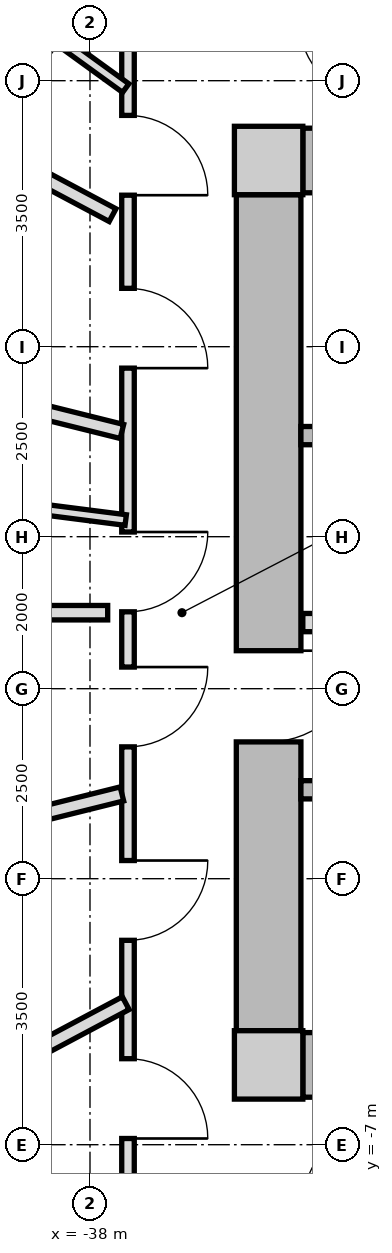
"""IFC4 building model, lengths in metres.
Left out: names, types, materials, properties, quantities, classifications, styles, units other than length and angle.
Written with IfcOpenShell. Run it as: python <this file> out.ifc"""

import sys

from ifc_helpers import new_model, si_unit, direction, frame, frame_2d, origin, origin_2d, place, context, subcontext, project, spatial, rectangle, extrude, source, transform, mapped, element, fill, save


model = new_model("IFC4")
c1 = context("Model", 3, precision=1e-05, world=origin(), true_north=direction((0.0, 1.0)))
c2 = subcontext(c1, "Body", "Model", "MODEL_VIEW")
j1 = project(units=[si_unit("LENGTHUNIT", "METRE"), si_unit("PLANEANGLEUNIT", "RADIAN")], contexts=[c1])
p1 = place(None, origin())
s1 = spatial("IfcSite", under=j1, at=p1, CompositionType="ELEMENT")
p2 = place(p1, origin())
s2 = spatial("IfcBuilding", under=s1, at=p2, CompositionType="ELEMENT")
p3 = place(p2, frame((0.0, 0.0, 42.95)))
s3 = spatial("IfcBuildingStorey", under=s2, at=p3, CompositionType="ELEMENT", Elevation=42.95)
m1 = source(origin(), c2, "Body", "SweptSolid", [
    extrude(rectangle(XDim=0.9, YDim=0.9, at=origin_2d()), origin(), (0.0, 0.0, 1.0), 3.05),
])
for number, where, z_axis, x_axis in (
    (1, (-35.65, -5.95, 0.0), (0.0, 0.0, 1.0), (1.0, 0.0, 0.0)),
    (2, (-35.65, 5.95, 0.0), (0.0, 0.0, 1.0), (1.0, 0.0, 0.0)),
):
    element("IfcColumn", number, at=place(p3, frame(where, z_axis=z_axis, x_axis=x_axis)), inside=s3, PredefinedType="COLUMN", context=c2, shape_type="MappedRepresentation", body=[
        mapped(m1, transform((0.0, 0.0, 0.0), x_axis=(1.0, 0.0, 0.0), y_axis=(0.0, 1.0, 0.0), z_axis=(0.0, 0.0, 1.0), scale=1.0)),
    ])
m2 = source(origin(), c2, "Body", "SweptSolid", [
    extrude(rectangle(XDim=14.4, YDim=0.85, at=frame_2d((7.2, 0.0))), origin(), (0.0, 0.0, 1.0), 2.79),
])
for number, where, z_axis, x_axis in (
    (3, (-35.2, 5.95, 0.0), (0.0, 0.0, 1.0), (1.0, 0.0, 0.0)),
    (4, (-20.8, -5.95, 0.0), (0.0, 0.0, 1.0), (-1.0, 0.0, 0.0)),
):
    element("IfcWall", number, at=place(p3, frame(where, z_axis=z_axis, x_axis=x_axis)), inside=s3, PredefinedType="SHEAR", context=c2, shape_type="MappedRepresentation", body=[
        mapped(m2, transform((0.0, 0.0, 0.0), x_axis=(1.0, 0.0, 0.0), y_axis=(0.0, 1.0, 0.0), z_axis=(0.0, 0.0, 1.0), scale=1.0)),
    ])
m3 = source(origin(), c2, "Body", "SweptSolid", [
    extrude(rectangle(XDim=11.0, YDim=0.85, at=frame_2d((5.5, 0.0))), origin(), (0.0, 0.0, 1.0), 2.79),
])
p4 = place(p3, frame((-35.65, -5.5, 0.0), z_axis=(0.0, 0.0, 1.0), x_axis=(0.0, 1.0, 0.0)))
e5 = element("IfcWall", 5, at=p4, inside=s3, PredefinedType="SHEAR", context=c2, shape_type="MappedRepresentation", body=[
    mapped(m3, transform((0.0, 0.0, 0.0), x_axis=(1.0, 0.0, 0.0), y_axis=(0.0, 1.0, 0.0), z_axis=(0.0, 0.0, 1.0), scale=1.0)),
])
p5 = place(p4, frame((3.8, 0.0, 0.0)))
e6 = element("IfcOpeningElement", 6, at=p5, cuts=e5, PredefinedType="OPENING", context=c2, shape_type="SweptSolid", body=[
    extrude(rectangle(XDim=1.2, YDim=2.15, at=frame_2d((0.6, 1.075))), frame((0.0, 0.435, 0.0), z_axis=(0.0, -1.0, 0.0), x_axis=(1.0, 0.0, 0.0)), (0.0, 0.0, 1.0), 0.87),
])
m4 = source(origin(), c2, "Body", "SweptSolid", [
    extrude(rectangle(XDim=7.765, YDim=0.24, at=frame_2d((3.883, 0.0))), origin(), (0.0, 0.0, 1.0), 2.79),
])
p6 = place(p3, frame((-35.225, 2.33, 0.0), z_axis=(0.0, 0.0, 1.0), x_axis=(1.0, 0.0, 0.0)))
e7 = element("IfcWall", 7, at=p6, inside=s3, PredefinedType="PARTITIONING", context=c2, shape_type="MappedRepresentation", body=[
    mapped(m4, transform((0.0, 0.0, 0.0), x_axis=(1.0, 0.0, 0.0), y_axis=(0.0, 1.0, 0.0), z_axis=(0.0, 0.0, 1.0), scale=1.0)),
])
p7 = place(p3, frame((-35.225, -2.33, 0.0), z_axis=(0.0, 0.0, 1.0), x_axis=(1.0, 0.0, 0.0)))
e8 = element("IfcWall", 8, at=p7, inside=s3, PredefinedType="PARTITIONING", context=c2, shape_type="MappedRepresentation", body=[
    mapped(m4, transform((0.0, 0.0, 0.0), x_axis=(1.0, 0.0, 0.0), y_axis=(0.0, 1.0, 0.0), z_axis=(0.0, 0.0, 1.0), scale=1.0)),
])
p8 = place(p7, frame((0.885, 0.0, 0.0)))
e9 = element("IfcOpeningElement", 9, at=p8, cuts=e8, PredefinedType="OPENING", context=c2, shape_type="SweptSolid", body=[
    extrude(rectangle(XDim=1.1, YDim=2.15, at=frame_2d((0.55, 1.075))), frame((0.0, 0.13, 0.0), z_axis=(0.0, -1.0, 0.0), x_axis=(1.0, 0.0, 0.0)), (0.0, 0.0, 1.0), 0.26),
])
m5 = source(origin(), c2, "Body", "SweptSolid", [
    extrude(rectangle(XDim=7.62, YDim=0.24, at=frame_2d((3.81, 0.0))), origin(), (0.0, 0.0, 1.0), 2.775),
])
p9 = place(p3, frame((-35.2, -0.13, 0.0), z_axis=(0.0, 0.0, 1.0), x_axis=(1.0, 0.0, 0.0)))
e10 = element("IfcWall", 10, at=p9, inside=s3, PredefinedType="PARTITIONING", context=c2, shape_type="MappedRepresentation", body=[
    mapped(m5, transform((0.0, 0.0, 0.0), x_axis=(1.0, 0.0, 0.0), y_axis=(0.0, 1.0, 0.0), z_axis=(0.0, 0.0, 1.0), scale=1.0)),
])
p10 = place(p9, frame((6.22, 0.0, 0.0)))
e11 = element("IfcOpeningElement", 11, at=p10, cuts=e10, PredefinedType="OPENING", context=c2, shape_type="SweptSolid", body=[
    extrude(rectangle(XDim=1.0, YDim=2.1, at=frame_2d((0.5, 1.05))), frame((0.0, 0.13, 0.0), z_axis=(0.0, -1.0, 0.0), x_axis=(1.0, 0.0, 0.0)), (0.0, 0.0, 1.0), 0.26),
])
p11 = place(p9, frame((0.85, 0.0, 0.0)))
e12 = element("IfcOpeningElement", 12, at=p11, cuts=e10, PredefinedType="OPENING", context=c2, shape_type="SweptSolid", body=[
    extrude(rectangle(XDim=1.1, YDim=2.2, at=frame_2d((0.55, 1.1))), frame((0.0, 0.13, 0.0), z_axis=(0.0, -1.0, 0.0), x_axis=(1.0, 0.0, 0.0)), (0.0, 0.0, 1.0), 0.26),
])
p12 = place(p9, frame((3.85, 0.0, 0.0)))
e13 = element("IfcOpeningElement", 13, at=p12, cuts=e10, PredefinedType="OPENING", context=c2, shape_type="SweptSolid", body=[
    extrude(rectangle(XDim=1.1, YDim=2.2, at=frame_2d((0.55, 1.1))), frame((0.0, 0.13, 0.0), z_axis=(0.0, -1.0, 0.0), x_axis=(1.0, 0.0, 0.0)), (0.0, 0.0, 1.0), 0.26),
])
m6 = source(origin(), c2, "Body", "SweptSolid", [
    extrude(rectangle(XDim=15.6, YDim=0.165, at=frame_2d((7.8, 0.0))), origin(), (0.0, 0.0, 1.0), 2.775),
])
p13 = place(p3, frame((-37.5, -7.8, 0.0), z_axis=(0.0, 0.0, 1.0), x_axis=(0.0, 1.0, 0.0)))
e14 = element("IfcWall", 14, at=p13, inside=s3, PredefinedType="PARTITIONING", context=c2, shape_type="MappedRepresentation", body=[
    mapped(m6, transform((0.0, 0.0, 0.0), x_axis=(1.0, 0.0, 0.0), y_axis=(0.0, 1.0, 0.0), z_axis=(0.0, 0.0, 1.0), scale=1.0)),
])
p14 = place(p13, frame((13.293, 0.0, 0.0)))
e15 = element("IfcOpeningElement", 15, at=p14, cuts=e14, PredefinedType="OPENING", context=c2, shape_type="SweptSolid", body=[
    extrude(rectangle(XDim=1.05, YDim=2.15, at=frame_2d((0.525, 1.075))), frame((0.0, 0.093, 0.0), z_axis=(0.0, -1.0, 0.0), x_axis=(1.0, 0.0, 0.0)), (0.0, 0.0, 1.0), 0.185),
])
p15 = place(p13, frame((11.018, 0.0, 0.0)))
e16 = element("IfcOpeningElement", 16, at=p15, cuts=e14, PredefinedType="OPENING", context=c2, shape_type="SweptSolid", body=[
    extrude(rectangle(XDim=1.05, YDim=2.15, at=frame_2d((0.525, 1.075))), frame((0.0, 0.093, 0.0), z_axis=(0.0, -1.0, 0.0), x_axis=(1.0, 0.0, 0.0)), (0.0, 0.0, 1.0), 0.185),
])
p16 = place(p13, frame((7.812, 0.0, 0.0)))
e17 = element("IfcOpeningElement", 17, at=p16, cuts=e14, PredefinedType="OPENING", context=c2, shape_type="SweptSolid", body=[
    extrude(rectangle(XDim=1.05, YDim=2.15, at=frame_2d((0.525, 1.075))), frame((0.0, 0.093, 0.0), z_axis=(0.0, -1.0, 0.0), x_axis=(1.0, 0.0, 0.0)), (0.0, 0.0, 1.0), 0.185),
])
p17 = place(p13, frame((6.035, 0.0, 0.0)))
e18 = element("IfcOpeningElement", 18, at=p17, cuts=e14, PredefinedType="OPENING", context=c2, shape_type="SweptSolid", body=[
    extrude(rectangle(XDim=1.05, YDim=2.15, at=frame_2d((0.525, 1.075))), frame((0.0, 0.093, 0.0), z_axis=(0.0, -1.0, 0.0), x_axis=(1.0, 0.0, 0.0)), (0.0, 0.0, 1.0), 0.185),
])
p18 = place(p13, frame((3.489, 0.0, 0.0)))
e19 = element("IfcOpeningElement", 19, at=p18, cuts=e14, PredefinedType="OPENING", context=c2, shape_type="SweptSolid", body=[
    extrude(rectangle(XDim=1.05, YDim=2.15, at=frame_2d((0.525, 1.075))), frame((0.0, 0.093, 0.0), z_axis=(0.0, -1.0, 0.0), x_axis=(1.0, 0.0, 0.0)), (0.0, 0.0, 1.0), 0.185),
])
p19 = place(p13, frame((0.882, 0.0, 0.0)))
e20 = element("IfcOpeningElement", 20, at=p19, cuts=e14, PredefinedType="OPENING", context=c2, shape_type="SweptSolid", body=[
    extrude(rectangle(XDim=1.05, YDim=2.15, at=frame_2d((0.525, 1.075))), frame((0.0, 0.093, 0.0), z_axis=(0.0, -1.0, 0.0), x_axis=(1.0, 0.0, 0.0)), (0.0, 0.0, 1.0), 0.185),
])
m7 = source(origin(), c2, "Body", "SweptSolid", [
    extrude(rectangle(XDim=9.737, YDim=0.19, at=frame_2d((4.869, 0.0))), origin(), (0.0, 0.0, 1.0), 2.225),
])
p20 = place(p3, frame((-37.58, 2.385, 0.0), z_axis=(0.0, 0.0, 1.0), x_axis=(-0.970392716238, 0.241532557375, 0.0)))
e21 = element("IfcWall", 21, at=p20, inside=s3, PredefinedType="PARTITIONING", context=c2, shape_type="MappedRepresentation", body=[
    mapped(m7, transform((0.0, 0.0, 0.0), x_axis=(1.0, 0.0, 0.0), y_axis=(0.0, 1.0, 0.0), z_axis=(0.0, 0.0, 1.0), scale=1.0)),
])
m8 = source(origin(), c2, "Body", "SweptSolid", [
    extrude(rectangle(XDim=7.677, YDim=0.19, at=frame_2d((3.838, 0.0))), origin(), (0.0, 0.0, 1.0), 2.775),
])
p21 = place(p3, frame((-37.703, 5.231, 0.0), z_axis=(0.0, 0.0, 1.0), x_axis=(-0.882725057546, 0.469889851753, 0.0)))
e22 = element("IfcWall", 22, at=p21, inside=s3, PredefinedType="PARTITIONING", context=c2, shape_type="MappedRepresentation", body=[
    mapped(m8, transform((0.0, 0.0, 0.0), x_axis=(1.0, 0.0, 0.0), y_axis=(0.0, 1.0, 0.0), z_axis=(0.0, 0.0, 1.0), scale=1.0)),
])
m9 = source(origin(), c2, "Body", "SweptSolid", [
    extrude(rectangle(XDim=3.051, YDim=0.14, at=frame_2d((1.525, 0.0))), origin(), (0.0, 0.0, 1.0), 2.775),
])
p22 = place(p3, frame((-37.53, 6.903, 0.0), z_axis=(0.0, 0.0, 1.0), x_axis=(-0.809849031404, 0.586638343729, 0.0)))
e23 = element("IfcWall", 23, at=p22, inside=s3, PredefinedType="PARTITIONING", context=c2, shape_type="MappedRepresentation", body=[
    mapped(m9, transform((0.0, 0.0, 0.0), x_axis=(1.0, 0.0, 0.0), y_axis=(0.0, 1.0, 0.0), z_axis=(0.0, 0.0, 1.0), scale=1.0)),
])
p23 = place(p22, frame((1.065, 0.0, 0.0)))
e24 = element("IfcOpeningElement", 24, at=p23, cuts=e23, PredefinedType="OPENING", context=c2, shape_type="SweptSolid", body=[
    extrude(rectangle(XDim=0.92, YDim=2.1, at=frame_2d((0.46, 1.05))), frame((0.0, 0.08, 0.0), z_axis=(0.0, -1.0, 0.0), x_axis=(1.0, 0.0, 0.0)), (0.0, 0.0, 1.0), 0.16),
])
p24 = place(p3, frame((-37.58, -2.385, 0.0), z_axis=(0.0, 0.0, 1.0), x_axis=(-0.970392716238, -0.241532557375, 0.0)))
e25 = element("IfcWall", 25, at=p24, inside=s3, PredefinedType="PARTITIONING", context=c2, shape_type="MappedRepresentation", body=[
    mapped(m7, transform((0.0, 0.0, 0.0), x_axis=(1.0, 0.0, 0.0), y_axis=(0.0, 1.0, 0.0), z_axis=(0.0, 0.0, 1.0), scale=1.0)),
])
m10 = source(origin(), c2, "Body", "SweptSolid", [
    extrude(rectangle(XDim=9.261, YDim=0.19, at=frame_2d((4.631, 0.0))), origin(), (0.0, 0.0, 1.0), 2.775),
])
p25 = place(p3, frame((-37.767, 0.0, 0.0), z_axis=(0.0, 0.0, 1.0), x_axis=(-1.0, 0.0, 0.0)))
e26 = element("IfcWall", 26, at=p25, inside=s3, PredefinedType="PARTITIONING", context=c2, shape_type="MappedRepresentation", body=[
    mapped(m10, transform((0.0, 0.0, 0.0), x_axis=(1.0, 0.0, 0.0), y_axis=(0.0, 1.0, 0.0), z_axis=(0.0, 0.0, 1.0), scale=1.0)),
])
m11 = source(origin(), c2, "Body", "SweptSolid", [
    extrude(rectangle(XDim=4.21, YDim=0.14, at=frame_2d((2.105, 0.0))), origin(), (0.0, 0.0, 1.0), 2.775),
])
p26 = place(p3, frame((-37.53, 1.219, 0.0), z_axis=(0.0, 0.0, 1.0), x_axis=(-0.991917821325, 0.126881975625, 0.0)))
e27 = element("IfcWall", 27, at=p26, inside=s3, PredefinedType="PARTITIONING", context=c2, shape_type="MappedRepresentation", body=[
    mapped(m11, transform((0.0, 0.0, 0.0), x_axis=(1.0, 0.0, 0.0), y_axis=(0.0, 1.0, 0.0), z_axis=(0.0, 0.0, 1.0), scale=1.0)),
])
p27 = place(p26, frame((1.645, 0.0, 0.0)))
e28 = element("IfcOpeningElement", 28, at=p27, cuts=e27, PredefinedType="OPENING", context=c2, shape_type="SweptSolid", body=[
    extrude(rectangle(XDim=0.92, YDim=2.1, at=frame_2d((0.46, 1.05))), frame((0.0, 0.08, 0.0), z_axis=(0.0, -1.0, 0.0), x_axis=(1.0, 0.0, 0.0)), (0.0, 0.0, 1.0), 0.16),
])
m12 = source(origin(), c2, "Body", "SweptSolid", [
    extrude(rectangle(XDim=7.873, YDim=0.19, at=frame_2d((3.937, 0.0))), origin(), (0.0, 0.0, 1.0), 2.775),
])
p28 = place(p3, frame((-37.53, -5.138, 0.0), z_axis=(0.0, 0.0, 1.0), x_axis=(-0.882666052726, -0.470000680175, 0.0)))
e29 = element("IfcWall", 29, at=p28, inside=s3, PredefinedType="PARTITIONING", context=c2, shape_type="MappedRepresentation", body=[
    mapped(m12, transform((0.0, 0.0, 0.0), x_axis=(1.0, 0.0, 0.0), y_axis=(0.0, 1.0, 0.0), z_axis=(0.0, 0.0, 1.0), scale=1.0)),
])
m13 = source(origin(), c2, "Body", "SweptSolid", [
    extrude(rectangle(XDim=1.2, YDim=2.15, at=frame_2d((0.6, 1.075))), frame((0.0, 0.025, 0.0), z_axis=(0.0, -1.0, 0.0), x_axis=(1.0, 0.0, 0.0)), (0.0, 0.0, 1.0), 0.05),
])
p29 = place(p5, frame((1.2, 0.0, 0.0), z_axis=(0.0, 0.0, 1.0), x_axis=(-1.0, 0.0, 0.0)))
e30 = element("IfcDoor", 30, at=p29, inside=s3, OperationType="SINGLE_SWING_LEFT", PredefinedType="DOOR", context=c2, shape_type="MappedRepresentation", body=[
    mapped(m13, transform((0.0, 0.0, 0.0), x_axis=(1.0, 0.0, 0.0), y_axis=(0.0, 1.0, 0.0), z_axis=(0.0, 0.0, 1.0), scale=1.0)),
])
fill(e6, e30)
m14 = source(origin(), c2, "Body", "SweptSolid", [
    extrude(rectangle(XDim=1.05, YDim=2.15, at=frame_2d((0.525, 1.075))), frame((0.0, 0.025, 0.0), z_axis=(0.0, -1.0, 0.0), x_axis=(1.0, 0.0, 0.0)), (0.0, 0.0, 1.0), 0.05),
])
p30 = place(p14, frame((1.05, 0.0, 0.0), z_axis=(0.0, 0.0, 1.0), x_axis=(-1.0, 0.0, 0.0)))
e31 = element("IfcDoor", 31, at=p30, inside=s3, OperationType="SINGLE_SWING_RIGHT", PredefinedType="DOOR", context=c2, shape_type="MappedRepresentation", body=[
    mapped(m14, transform((0.0, 0.0, 0.0), x_axis=(1.0, 0.0, 0.0), y_axis=(0.0, 1.0, 0.0), z_axis=(0.0, 0.0, 1.0), scale=1.0)),
])
fill(e15, e31)
p31 = place(p15, frame((1.05, 0.0, 0.0), z_axis=(0.0, 0.0, 1.0), x_axis=(-1.0, 0.0, 0.0)))
e32 = element("IfcDoor", 32, at=p31, inside=s3, OperationType="SINGLE_SWING_RIGHT", PredefinedType="DOOR", context=c2, shape_type="MappedRepresentation", body=[
    mapped(m14, transform((0.0, 0.0, 0.0), x_axis=(1.0, 0.0, 0.0), y_axis=(0.0, 1.0, 0.0), z_axis=(0.0, 0.0, 1.0), scale=1.0)),
])
fill(e16, e32)
p32 = place(p16, frame((1.05, 0.0, 0.0), z_axis=(0.0, 0.0, 1.0), x_axis=(-1.0, 0.0, 0.0)))
e33 = element("IfcDoor", 33, at=p32, inside=s3, OperationType="SINGLE_SWING_LEFT", PredefinedType="DOOR", context=c2, shape_type="MappedRepresentation", body=[
    mapped(m14, transform((0.0, 0.0, 0.0), x_axis=(1.0, 0.0, 0.0), y_axis=(0.0, 1.0, 0.0), z_axis=(0.0, 0.0, 1.0), scale=1.0)),
])
fill(e17, e33)
p33 = place(p17, frame((1.05, 0.0, 0.0), z_axis=(0.0, 0.0, 1.0), x_axis=(-1.0, 0.0, 0.0)))
e34 = element("IfcDoor", 34, at=p33, inside=s3, OperationType="SINGLE_SWING_LEFT", PredefinedType="DOOR", context=c2, shape_type="MappedRepresentation", body=[
    mapped(m14, transform((0.0, 0.0, 0.0), x_axis=(1.0, 0.0, 0.0), y_axis=(0.0, 1.0, 0.0), z_axis=(0.0, 0.0, 1.0), scale=1.0)),
])
fill(e18, e34)
p34 = place(p18, frame((1.05, 0.0, 0.0), z_axis=(0.0, 0.0, 1.0), x_axis=(-1.0, 0.0, 0.0)))
e35 = element("IfcDoor", 35, at=p34, inside=s3, OperationType="SINGLE_SWING_LEFT", PredefinedType="DOOR", context=c2, shape_type="MappedRepresentation", body=[
    mapped(m14, transform((0.0, 0.0, 0.0), x_axis=(1.0, 0.0, 0.0), y_axis=(0.0, 1.0, 0.0), z_axis=(0.0, 0.0, 1.0), scale=1.0)),
])
fill(e19, e35)
p35 = place(p19, frame((1.05, 0.0, 0.0), z_axis=(0.0, 0.0, 1.0), x_axis=(-1.0, 0.0, 0.0)))
e36 = element("IfcDoor", 36, at=p35, inside=s3, OperationType="SINGLE_SWING_RIGHT", PredefinedType="DOOR", context=c2, shape_type="MappedRepresentation", body=[
    mapped(m14, transform((0.0, 0.0, 0.0), x_axis=(1.0, 0.0, 0.0), y_axis=(0.0, 1.0, 0.0), z_axis=(0.0, 0.0, 1.0), scale=1.0)),
])
fill(e20, e36)
save(model, sys.argv[1])
